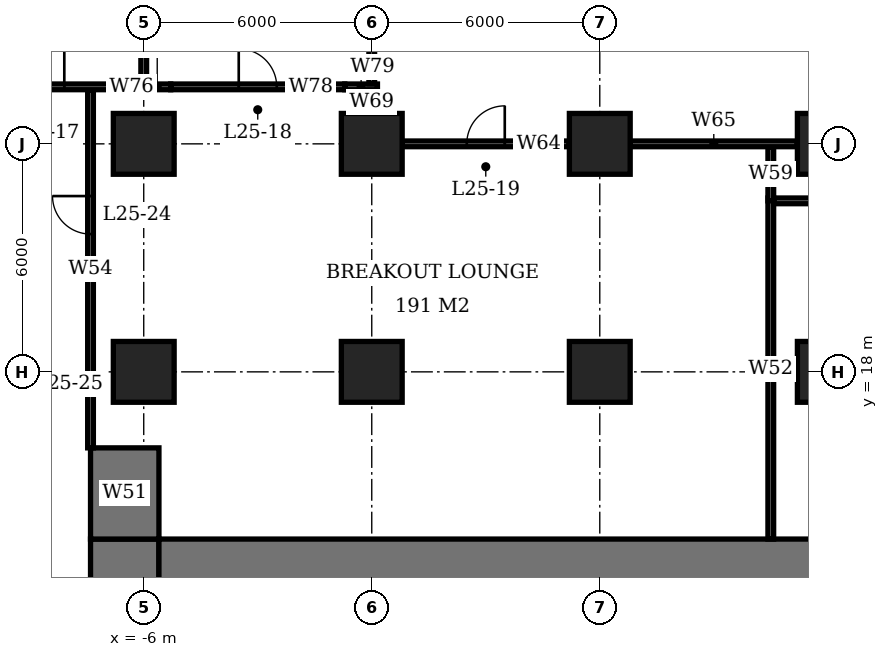
"""IFC4 building model, lengths in metres.
Left out: names, types, materials, properties, quantities, classifications, styles, units other than length and angle.
Written with IfcOpenShell. Run it as: python <this file> out.ifc"""

import sys

from ifc_helpers import new_model, si_unit, direction, frame, frame_2d, origin, origin_2d, place, context, subcontext, project, spatial, rectangle, extrude, element, fill, save


model = new_model("IFC4")
c1 = context("Model", 3, precision=1e-05, world=origin(), true_north=direction((0.0, 1.0)))
c2 = subcontext(c1, "Body", "Model", "MODEL_VIEW")
j1 = project(units=[si_unit("LENGTHUNIT", "METRE"), si_unit("PLANEANGLEUNIT", "RADIAN")], contexts=[c1])
p1 = place(None, origin())
s1 = spatial("IfcSite", under=j1, at=p1, CompositionType="ELEMENT")
p2 = place(p1, origin())
s2 = spatial("IfcBuilding", under=s1, at=p2, CompositionType="ELEMENT")
p3 = place(p2, frame((0.0, 0.0, 105.5)))
s3 = spatial("IfcBuildingStorey", under=s2, at=p3, CompositionType="ELEMENT", Elevation=105.5)
for number, where, z_axis, x_axis in (
    (1, (-6.0, 18.0, 0.0), (0.0, 0.0, 1.0), (1.0, 0.0, 0.0)),
    (2, (-6.0, 24.0, 0.0), (0.0, 0.0, 1.0), (1.0, 0.0, 0.0)),
    (3, (0.0, 18.0, 0.0), (0.0, 0.0, 1.0), (1.0, 0.0, 0.0)),
    (4, (0.0, 24.0, 0.0), (0.0, 0.0, 1.0), (1.0, 0.0, 0.0)),
    (5, (6.0, 18.0, 0.0), (0.0, 0.0, 1.0), (1.0, 0.0, 0.0)),
    (6, (6.0, 24.0, 0.0), (0.0, 0.0, 1.0), (1.0, 0.0, 0.0)),
    (7, (12.0, 18.0, 0.0), (0.0, 0.0, 1.0), (1.0, 0.0, 0.0)),
    (8, (12.0, 24.0, 0.0), (0.0, 0.0, 1.0), (1.0, 0.0, 0.0)),
):
    element("IfcColumn", number, at=place(p3, frame(where, z_axis=z_axis, x_axis=x_axis)), inside=s3, PredefinedType="COLUMN", context=c2, shape_type="SweptSolid", body=[
        extrude(rectangle(XDim=1.6, YDim=1.6, at=origin_2d()), origin(), (0.0, 0.0, 1.0), 3.9),
    ])
p4 = place(p3, frame((-5.6, 12.6, 0.0), z_axis=(0.0, 0.0, 1.0), x_axis=(1.0, 0.0, 0.0)))
e9 = element("IfcWall", 9, at=p4, inside=s3, PredefinedType="SHEAR", context=c2, shape_type="SweptSolid", body=[
    extrude(rectangle(XDim=23.2, YDim=2.0, at=frame_2d((11.6, 0.0))), origin(), (0.0, 0.0, 1.0), 3.9),
])
p5 = place(p3, frame((-6.5, -7.6, 0.0), z_axis=(0.0, 0.0, 1.0), x_axis=(0.0, 1.0, 0.0)))
e10 = element("IfcWall", 10, at=p5, inside=s3, PredefinedType="SHEAR", context=c2, shape_type="SweptSolid", body=[
    extrude(rectangle(XDim=21.2, YDim=1.8, at=frame_2d((10.6, 0.0))), origin(), (0.0, 0.0, 1.0), 3.9),
])
p6 = place(p5, frame((7.8, 0.0, 0.0)))
e11 = element("IfcOpeningElement", 11, at=p6, cuts=e10, PredefinedType="OPENING", context=c2, shape_type="SweptSolid", body=[
    extrude(rectangle(XDim=1.8, YDim=2.4, at=frame_2d((0.9, 1.2))), frame((0.0, 0.91, 0.0), z_axis=(0.0, -1.0, 0.0), x_axis=(1.0, 0.0, 0.0)), (0.0, 0.0, 1.0), 1.82),
])
p7 = place(p3, frame((-6.5, 13.6, 0.0), z_axis=(0.0, 0.0, 1.0), x_axis=(0.0, 1.0, 0.0)))
e12 = element("IfcWall", 12, at=p7, inside=s3, PredefinedType="SHEAR", context=c2, shape_type="SweptSolid", body=[
    extrude(rectangle(XDim=2.4, YDim=1.8, at=frame_2d((1.2, 0.0))), origin(), (0.0, 0.0, 1.0), 3.9),
])
p8 = place(p3, frame((0.8, 24.0, 0.0), z_axis=(0.0, 0.0, 1.0), x_axis=(1.0, 0.0, 0.0)))
e13 = element("IfcWall", 13, at=p8, inside=s3, PredefinedType="PARTITIONING", context=c2, shape_type="SweptSolid", body=[
    extrude(rectangle(XDim=4.4, YDim=0.15, at=frame_2d((2.2, 0.0))), origin(), (0.0, 0.0, 1.0), 3.65),
])
p9 = place(p8, frame((1.7, 0.0, 0.0)))
e14 = element("IfcOpeningElement", 14, at=p9, cuts=e13, PredefinedType="OPENING", context=c2, shape_type="SweptSolid", body=[
    extrude(rectangle(XDim=1.0, YDim=2.1, at=frame_2d((0.5, 1.05))), frame((0.0, 0.085, 0.0), z_axis=(0.0, -1.0, 0.0), x_axis=(1.0, 0.0, 0.0)), (0.0, 0.0, 1.0), 0.17),
])
p10 = place(p3, frame((6.8, 24.0, 0.0), z_axis=(0.0, 0.0, 1.0), x_axis=(1.0, 0.0, 0.0)))
e15 = element("IfcWall", 15, at=p10, inside=s3, PredefinedType="PARTITIONING", context=c2, shape_type="SweptSolid", body=[
    extrude(rectangle(XDim=4.4, YDim=0.15, at=frame_2d((2.2, 0.0))), origin(), (0.0, 0.0, 1.0), 3.65),
])
p11 = place(p3, frame((-11.49, 25.5, 0.0), z_axis=(0.0, 0.0, 1.0), x_axis=(1.0, 0.0, 0.0)))
e16 = element("IfcWall", 16, at=p11, inside=s3, PredefinedType="PARTITIONING", context=c2, shape_type="SweptSolid", body=[
    extrude(rectangle(XDim=4.78, YDim=0.15, at=frame_2d((2.39, 0.0))), origin(), (0.0, 0.0, 1.0), 3.65),
])
p12 = place(p11, frame((2.4, 0.0, 0.0)))
e17 = element("IfcOpeningElement", 17, at=p12, cuts=e16, PredefinedType="OPENING", context=c2, shape_type="SweptSolid", body=[
    extrude(rectangle(XDim=1.0, YDim=2.1, at=frame_2d((0.5, 1.05))), frame((0.0, 0.085, 0.0), z_axis=(0.0, -1.0, 0.0), x_axis=(1.0, 0.0, 0.0)), (0.0, 0.0, 1.0), 0.17),
])
p13 = place(p3, frame((-6.71, 25.5, 0.0), z_axis=(0.0, 0.0, 1.0), x_axis=(1.0, 0.0, 0.0)))
e18 = element("IfcWall", 18, at=p13, inside=s3, PredefinedType="PARTITIONING", context=c2, shape_type="SweptSolid", body=[
    extrude(rectangle(XDim=0.785, YDim=0.15, at=frame_2d((0.393, 0.0))), origin(), (0.0, 0.0, 1.0), 2.65),
])
p14 = place(p3, frame((-6.0, 25.5, 0.0), z_axis=(0.0, 0.0, 1.0), x_axis=(1.0, 0.0, 0.0)))
e19 = element("IfcWall", 19, at=p14, inside=s3, PredefinedType="PARTITIONING", context=c2, shape_type="SweptSolid", body=[
    extrude(rectangle(XDim=0.71, YDim=0.15, at=frame_2d((0.355, 0.0))), origin(), (0.0, 0.0, 1.0), 2.65),
])
p15 = place(p3, frame((-5.29, 25.5, 0.0), z_axis=(0.0, 0.0, 1.0), x_axis=(1.0, 0.0, 0.0)))
e20 = element("IfcWall", 20, at=p15, inside=s3, PredefinedType="PARTITIONING", context=c2, shape_type="SweptSolid", body=[
    extrude(rectangle(XDim=4.58, YDim=0.15, at=frame_2d((2.29, 0.0))), origin(), (0.0, 0.0, 1.0), 3.65),
])
p16 = place(p15, frame((1.79, 0.0, 0.0)))
e21 = element("IfcOpeningElement", 21, at=p16, cuts=e20, PredefinedType="OPENING", context=c2, shape_type="SweptSolid", body=[
    extrude(rectangle(XDim=1.0, YDim=2.1, at=frame_2d((0.5, 1.05))), frame((0.0, 0.085, 0.0), z_axis=(0.0, -1.0, 0.0), x_axis=(1.0, 0.0, 0.0)), (0.0, 0.0, 1.0), 0.17),
])
p17 = place(p3, frame((-0.71, 25.5, 0.0), z_axis=(0.0, 0.0, 1.0), x_axis=(1.0, 0.0, 0.0)))
e22 = element("IfcWall", 22, at=p17, inside=s3, PredefinedType="PARTITIONING", context=c2, shape_type="SweptSolid", body=[
    extrude(rectangle(XDim=0.86, YDim=0.15, at=frame_2d((0.43, 0.0))), origin(), (0.0, 0.0, 1.0), 2.65),
])
p18 = place(p3, frame((-6.0, 25.575, 0.0), z_axis=(0.0, 0.0, 1.0), x_axis=(0.0, 1.0, 0.0)))
e23 = element("IfcWall", 23, at=p18, inside=s3, PredefinedType="PARTITIONING", context=c2, shape_type="SweptSolid", body=[
    extrude(rectangle(XDim=2.735, YDim=0.15, at=frame_2d((1.368, 0.0))), origin(), (0.0, 0.0, 1.0), 2.65),
])
p19 = place(p3, frame((0.0, 24.8, 0.0), z_axis=(0.0, 0.0, 1.0), x_axis=(0.0, 1.0, 0.0)))
e24 = element("IfcWall", 24, at=p19, inside=s3, PredefinedType="PARTITIONING", context=c2, shape_type="SweptSolid", body=[
    extrude(rectangle(XDim=0.625, YDim=0.15, at=frame_2d((0.312, 0.0))), origin(), (0.0, 0.0, 1.0), 2.65),
])
p20 = place(p3, frame((0.0, 25.575, 0.0), z_axis=(0.0, 0.0, 1.0), x_axis=(0.0, 1.0, 0.0)))
e25 = element("IfcWall", 25, at=p20, inside=s3, PredefinedType="PARTITIONING", context=c2, shape_type="SweptSolid", body=[
    extrude(rectangle(XDim=2.735, YDim=0.15, at=frame_2d((1.368, 0.0))), origin(), (0.0, 0.0, 1.0), 2.65),
])
p21 = place(p3, frame((-7.4, 16.0, 0.0), z_axis=(0.0, 0.0, 1.0), x_axis=(0.0, 1.0, 0.0)))
e26 = element("IfcWall", 26, at=p21, inside=s3, PredefinedType="PARTITIONING", context=c2, shape_type="SweptSolid", body=[
    extrude(rectangle(XDim=9.425, YDim=0.15, at=frame_2d((4.712, 0.0))), origin(), (0.0, 0.0, 1.0), 3.65),
])
p22 = place(p21, frame((5.626, 0.0, 0.0)))
e27 = element("IfcOpeningElement", 27, at=p22, cuts=e26, PredefinedType="OPENING", context=c2, shape_type="SweptSolid", body=[
    extrude(rectangle(XDim=1.0, YDim=2.1, at=frame_2d((0.5, 1.05))), frame((0.0, 0.085, 0.0), z_axis=(0.0, -1.0, 0.0), x_axis=(1.0, 0.0, 0.0)), (0.0, 0.0, 1.0), 0.17),
])
p23 = place(p3, frame((10.5, 13.6, 0.0), z_axis=(0.0, 0.0, 1.0), x_axis=(0.0, 1.0, 0.0)))
e28 = element("IfcWall", 28, at=p23, inside=s3, PredefinedType="PARTITIONING", context=c2, shape_type="SweptSolid", body=[
    extrude(rectangle(XDim=8.975, YDim=0.15, at=frame_2d((4.487, 0.0))), origin(), (0.0, 0.0, 1.0), 3.65),
])
p24 = place(p3, frame((10.5, 22.5, 0.0), z_axis=(0.0, 0.0, 1.0), x_axis=(0.0, 1.0, 0.0)))
e29 = element("IfcWall", 29, at=p24, inside=s3, PredefinedType="PARTITIONING", context=c2, shape_type="SweptSolid", body=[
    extrude(rectangle(XDim=1.425, YDim=0.15, at=frame_2d((0.712, 0.0))), origin(), (0.0, 0.0, 1.0), 3.65),
])
p25 = place(p3, frame((10.575, 22.5, 0.0), z_axis=(0.0, 0.0, 1.0), x_axis=(1.0, 0.0, 0.0)))
e30 = element("IfcWall", 30, at=p25, inside=s3, PredefinedType="PARTITIONING", context=c2, shape_type="SweptSolid", body=[
    extrude(rectangle(XDim=8.975, YDim=0.15, at=frame_2d((4.488, 0.0))), origin(), (0.0, 0.0, 1.0), 3.65),
])
p26 = place(p12, origin())
e31 = element("IfcDoor", 31, at=p26, inside=s3, OperationType="SINGLE_SWING_RIGHT", PredefinedType="DOOR", context=c2, shape_type="SweptSolid", body=[
    extrude(rectangle(XDim=1.0, YDim=2.1, at=frame_2d((0.5, 1.05))), frame((0.0, 0.025, 0.0), z_axis=(0.0, -1.0, 0.0), x_axis=(1.0, 0.0, 0.0)), (0.0, 0.0, 1.0), 0.05),
])
fill(e17, e31)
p27 = place(p16, origin())
e32 = element("IfcDoor", 32, at=p27, inside=s3, OperationType="SINGLE_SWING_LEFT", PredefinedType="DOOR", context=c2, shape_type="SweptSolid", body=[
    extrude(rectangle(XDim=1.0, YDim=2.1, at=frame_2d((0.5, 1.05))), frame((0.0, 0.025, 0.0), z_axis=(0.0, -1.0, 0.0), x_axis=(1.0, 0.0, 0.0)), (0.0, 0.0, 1.0), 0.05),
])
fill(e21, e32)
p28 = place(p9, origin())
e33 = element("IfcDoor", 33, at=p28, inside=s3, OperationType="SINGLE_SWING_RIGHT", PredefinedType="DOOR", context=c2, shape_type="SweptSolid", body=[
    extrude(rectangle(XDim=1.0, YDim=2.1, at=frame_2d((0.5, 1.05))), frame((0.0, 0.025, 0.0), z_axis=(0.0, -1.0, 0.0), x_axis=(1.0, 0.0, 0.0)), (0.0, 0.0, 1.0), 0.05),
])
fill(e14, e33)
p29 = place(p22, origin())
e34 = element("IfcDoor", 34, at=p29, inside=s3, OperationType="SINGLE_SWING_RIGHT", PredefinedType="DOOR", context=c2, shape_type="SweptSolid", body=[
    extrude(rectangle(XDim=1.0, YDim=2.1, at=frame_2d((0.5, 1.05))), frame((0.0, 0.025, 0.0), z_axis=(0.0, -1.0, 0.0), x_axis=(1.0, 0.0, 0.0)), (0.0, 0.0, 1.0), 0.05),
])
fill(e27, e34)
save(model, sys.argv[1])
